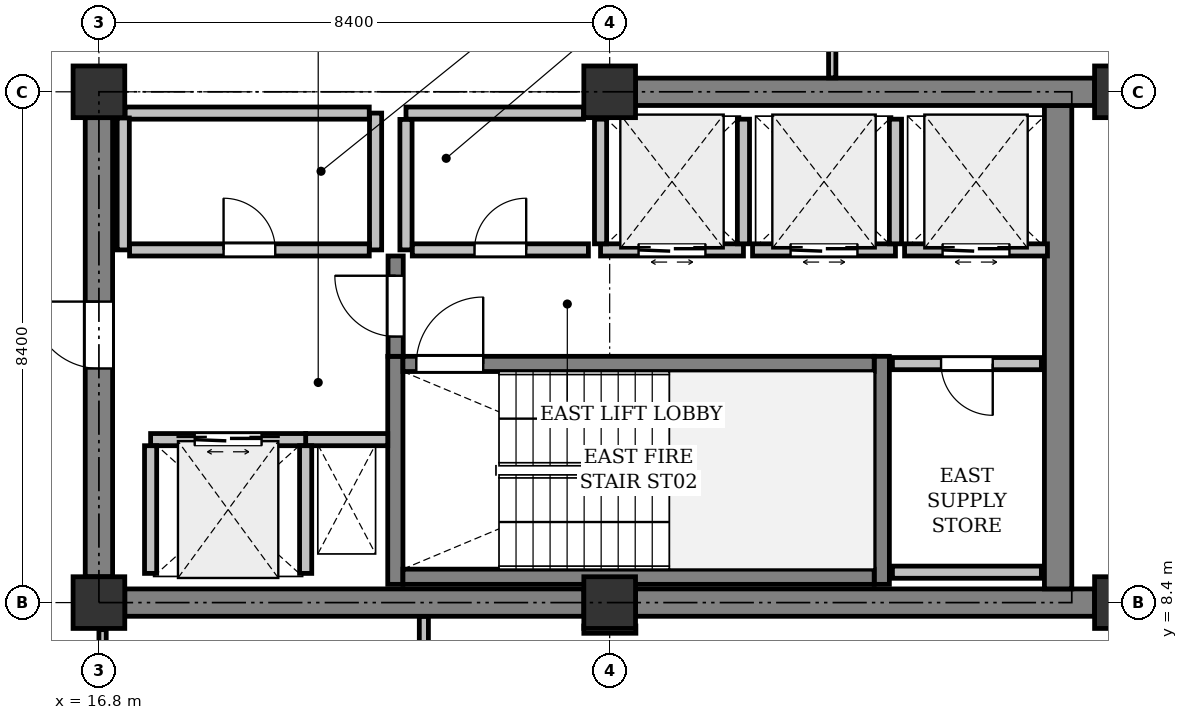
"""IFC4 building model, lengths in metres.
Left out: names, types, materials, properties, quantities, classifications, styles, units other than length and angle.
Written with IfcOpenShell. Run it as: python <this file> out.ifc"""

import sys

from ifc_helpers import new_model, si_unit, direction, frame, frame_2d, origin, origin_2d, place, context, subcontext, project, spatial, rectangle, extrude, element, fill, save


model = new_model("IFC4")
c1 = context("Model", 3, precision=1e-05, world=origin(), true_north=direction((0.0, 1.0)))
c2 = subcontext(c1, "Body", "Model", "MODEL_VIEW")
j1 = project(units=[si_unit("LENGTHUNIT", "METRE"), si_unit("PLANEANGLEUNIT", "RADIAN")], contexts=[c1])
p1 = place(None, origin())
s1 = spatial("IfcSite", under=j1, at=p1, CompositionType="ELEMENT")
p2 = place(p1, origin())
s2 = spatial("IfcBuilding", under=s1, at=p2, CompositionType="ELEMENT")
p3 = place(p2, frame((0.0, 0.0, 290.2)))
s3 = spatial("IfcBuildingStorey", under=s2, at=p3, CompositionType="ELEMENT", Elevation=290.2)
for number, where, z_axis, x_axis in (
    (1, (16.8, 8.4, 0.0), (0.0, 0.0, 1.0), (1.0, 0.0, 0.0)),
    (2, (16.8, 16.8, 0.0), (0.0, 0.0, 1.0), (1.0, 0.0, 0.0)),
    (3, (25.2, 8.4, 0.0), (0.0, 0.0, 1.0), (1.0, 0.0, 0.0)),
    (4, (25.2, 16.8, 0.0), (0.0, 0.0, 1.0), (1.0, 0.0, 0.0)),
    (5, (33.6, 8.4, 0.0), (0.0, 0.0, 1.0), (1.0, 0.0, 0.0)),
    (6, (33.6, 16.8, 0.0), (0.0, 0.0, 1.0), (1.0, 0.0, 0.0)),
):
    element("IfcColumn", number, at=place(p3, frame(where, z_axis=z_axis, x_axis=x_axis)), inside=s3, PredefinedType="COLUMN", context=c2, shape_type="SweptSolid", body=[
        extrude(rectangle(XDim=0.85, YDim=0.85, at=origin_2d()), origin(), (0.0, 0.0, 1.0), 4.0),
    ])
p4 = place(p3, frame((17.225, 8.4, 0.0), z_axis=(0.0, 0.0, 1.0), x_axis=(1.0, 0.0, 0.0)))
e7 = element("IfcWall", 7, at=p4, inside=s3, PredefinedType="SHEAR", context=c2, shape_type="SweptSolid", body=[
    extrude(rectangle(XDim=7.55, YDim=0.45, at=frame_2d((3.775, 0.0))), origin(), (0.0, 0.0, 1.0), 3.725),
])
p5 = place(p3, frame((25.625, 8.4, 0.0), z_axis=(0.0, 0.0, 1.0), x_axis=(1.0, 0.0, 0.0)))
e8 = element("IfcWall", 8, at=p5, inside=s3, PredefinedType="SHEAR", context=c2, shape_type="SweptSolid", body=[
    extrude(rectangle(XDim=7.55, YDim=0.45, at=frame_2d((3.775, 0.0))), origin(), (0.0, 0.0, 1.0), 3.725),
])
p6 = place(p3, frame((32.575, 8.625, 0.0), z_axis=(0.0, 0.0, 1.0), x_axis=(0.0, 1.0, 0.0)))
e9 = element("IfcWall", 9, at=p6, inside=s3, PredefinedType="SHEAR", context=c2, shape_type="SweptSolid", body=[
    extrude(rectangle(XDim=7.95, YDim=0.45, at=frame_2d((3.975, 0.0))), origin(), (0.0, 0.0, 1.0), 3.725),
])
p7 = place(p3, frame((16.8, 8.825, 0.0), z_axis=(0.0, 0.0, 1.0), x_axis=(0.0, 1.0, 0.0)))
e10 = element("IfcWall", 10, at=p7, inside=s3, PredefinedType="SHEAR", context=c2, shape_type="SweptSolid", body=[
    extrude(rectangle(XDim=7.55, YDim=0.45, at=frame_2d((3.775, 0.0))), origin(), (0.0, 0.0, 1.0), 3.725),
])
p8 = place(p7, frame((3.425, 0.0, 0.0)))
e11 = element("IfcOpeningElement", 11, at=p8, cuts=e10, PredefinedType="OPENING", context=c2, shape_type="SweptSolid", body=[
    extrude(rectangle(XDim=1.1, YDim=2.15, at=frame_2d((0.55, 1.075))), frame((0.0, 0.235, 0.0), z_axis=(0.0, -1.0, 0.0), x_axis=(1.0, 0.0, 0.0)), (0.0, 0.0, 1.0), 0.47),
])
p9 = place(p3, frame((25.625, 16.8, 0.0), z_axis=(0.0, 0.0, 1.0), x_axis=(1.0, 0.0, 0.0)))
e12 = element("IfcWall", 12, at=p9, inside=s3, PredefinedType="SHEAR", context=c2, shape_type="SweptSolid", body=[
    extrude(rectangle(XDim=7.55, YDim=0.45, at=frame_2d((3.775, 0.0))), origin(), (0.0, 0.0, 1.0), 3.725),
])
for number, where, z_axis, x_axis in (
    (13, (21.675, 8.7, 0.0), (0.0, 0.0, 1.0), (0.0, 1.0, 0.0)),
    (14, (29.675, 8.7, 0.0), (0.0, 0.0, 1.0), (0.0, 1.0, 0.0)),
):
    element("IfcWall", number, at=place(p3, frame(where, z_axis=z_axis, x_axis=x_axis)), inside=s3, PredefinedType="SHEAR", context=c2, shape_type="SweptSolid", body=[
        extrude(rectangle(XDim=3.75, YDim=0.25, at=frame_2d((1.875, 0.0))), origin(), (0.0, 0.0, 1.0), 3.725),
    ])
p10 = place(p3, frame((21.8, 8.825, 0.0), z_axis=(0.0, 0.0, 1.0), x_axis=(1.0, 0.0, 0.0)))
e15 = element("IfcWall", 15, at=p10, inside=s3, PredefinedType="SHEAR", context=c2, shape_type="SweptSolid", body=[
    extrude(rectangle(XDim=7.75, YDim=0.25, at=frame_2d((3.875, 0.0))), origin(), (0.0, 0.0, 1.0), 3.725),
])
p11 = place(p3, frame((21.8, 12.325, 0.0), z_axis=(0.0, 0.0, 1.0), x_axis=(1.0, 0.0, 0.0)))
e16 = element("IfcWall", 16, at=p11, inside=s3, PredefinedType="SHEAR", context=c2, shape_type="SweptSolid", body=[
    extrude(rectangle(XDim=7.75, YDim=0.25, at=frame_2d((3.875, 0.0))), origin(), (0.0, 0.0, 1.0), 3.725),
])
p12 = place(p11, frame((0.22, 0.0, 0.0)))
e17 = element("IfcOpeningElement", 17, at=p12, cuts=e16, PredefinedType="OPENING", context=c2, shape_type="SweptSolid", body=[
    extrude(rectangle(XDim=1.1, YDim=2.15, at=frame_2d((0.55, 1.075))), frame((0.0, 0.135, 0.0), z_axis=(0.0, -1.0, 0.0), x_axis=(1.0, 0.0, 0.0)), (0.0, 0.0, 1.0), 0.27),
])
p13 = place(p3, frame((20.2, 11.08, 0.0), z_axis=(0.0, 0.0, 1.0), x_axis=(1.0, 0.0, 0.0)))
e18 = element("IfcWall", 18, at=p13, inside=s3, PredefinedType="PARTITIONING", context=c2, shape_type="SweptSolid", body=[
    extrude(rectangle(XDim=1.35, YDim=0.2, at=frame_2d((0.675, 0.0))), origin(), (0.0, 0.0, 1.0), 3.725),
])
p14 = place(p3, frame((21.68, 12.45, 0.0), z_axis=(0.0, 0.0, 1.0), x_axis=(0.0, 1.0, 0.0)))
e19 = element("IfcWall", 19, at=p14, inside=s3, PredefinedType="SHEAR", context=c2, shape_type="SweptSolid", body=[
    extrude(rectangle(XDim=1.65, YDim=0.25, at=frame_2d((0.825, 0.0))), origin(), (0.0, 0.0, 1.0), 3.725),
])
p15 = place(p14, frame((0.325, 0.0, 0.0)))
e20 = element("IfcOpeningElement", 20, at=p15, cuts=e19, PredefinedType="OPENING", context=c2, shape_type="SweptSolid", body=[
    extrude(rectangle(XDim=1.0, YDim=2.15, at=frame_2d((0.5, 1.075))), frame((0.0, 0.135, 0.0), z_axis=(0.0, -1.0, 0.0), x_axis=(1.0, 0.0, 0.0)), (0.0, 0.0, 1.0), 0.27),
])
p16 = place(p3, frame((17.65, 11.08, 0.0), z_axis=(0.0, 0.0, 1.0), x_axis=(1.0, 0.0, 0.0)))
e21 = element("IfcWall", 21, at=p16, inside=s3, PredefinedType="PARTITIONING", context=c2, shape_type="SweptSolid", body=[
    extrude(rectangle(XDim=2.55, YDim=0.2, at=frame_2d((1.275, 0.0))), origin(), (0.0, 0.0, 1.0), 3.725),
])
p17 = place(p16, frame((0.725, 0.0, 0.0)))
e22 = element("IfcOpeningElement", 22, at=p17, cuts=e21, PredefinedType="OPENING", context=c2, shape_type="SweptSolid", body=[
    extrude(rectangle(XDim=1.1, YDim=2.2, at=frame_2d((0.55, 1.1))), frame((0.0, 0.11, 0.0), z_axis=(0.0, -1.0, 0.0), x_axis=(1.0, 0.0, 0.0)), (0.0, 0.0, 1.0), 0.22),
])
for number, where, z_axis, x_axis in (
    (23, (20.2, 8.88, 0.0), (0.0, 0.0, 1.0), (0.0, 1.0, 0.0)),
    (24, (17.65, 8.88, 0.0), (0.0, 0.0, 1.0), (0.0, 1.0, 0.0)),
):
    element("IfcWall", number, at=place(p3, frame(where, z_axis=z_axis, x_axis=x_axis)), inside=s3, PredefinedType="PARTITIONING", context=c2, shape_type="SweptSolid", body=[
        extrude(rectangle(XDim=2.1, YDim=0.2, at=frame_2d((1.05, 0.0))), origin(), (0.0, 0.0, 1.0), 3.725),
    ])
p18 = place(p3, frame((25.05, 14.2, 0.0), z_axis=(0.0, 0.0, 1.0), x_axis=(1.0, 0.0, 0.0)))
e25 = element("IfcWall", 25, at=p18, inside=s3, PredefinedType="PARTITIONING", context=c2, shape_type="SweptSolid", body=[
    extrude(rectangle(XDim=2.35, YDim=0.2, at=frame_2d((1.175, 0.0))), origin(), (0.0, 0.0, 1.0), 3.725),
])
p19 = place(p18, frame((0.625, 0.0, 0.0)))
e26 = element("IfcOpeningElement", 26, at=p19, cuts=e25, PredefinedType="OPENING", context=c2, shape_type="SweptSolid", body=[
    extrude(rectangle(XDim=1.1, YDim=2.2, at=frame_2d((0.55, 1.1))), frame((0.0, 0.11, 0.0), z_axis=(0.0, -1.0, 0.0), x_axis=(1.0, 0.0, 0.0)), (0.0, 0.0, 1.0), 0.22),
])
for number, where, z_axis, x_axis in (
    (27, (27.4, 14.3, 0.0), (0.0, 0.0, 1.0), (0.0, 1.0, 0.0)),
    (28, (25.05, 14.3, 0.0), (0.0, 0.0, 1.0), (0.0, 1.0, 0.0)),
):
    element("IfcWall", number, at=place(p3, frame(where, z_axis=z_axis, x_axis=x_axis)), inside=s3, PredefinedType="PARTITIONING", context=c2, shape_type="SweptSolid", body=[
        extrude(rectangle(XDim=2.05, YDim=0.2, at=frame_2d((1.025, 0.0))), origin(), (0.0, 0.0, 1.0), 3.725),
    ])
p20 = place(p3, frame((27.55, 14.2, 0.0), z_axis=(0.0, 0.0, 1.0), x_axis=(1.0, 0.0, 0.0)))
e29 = element("IfcWall", 29, at=p20, inside=s3, PredefinedType="PARTITIONING", context=c2, shape_type="SweptSolid", body=[
    extrude(rectangle(XDim=2.35, YDim=0.2, at=frame_2d((1.175, 0.0))), origin(), (0.0, 0.0, 1.0), 3.725),
])
p21 = place(p20, frame((0.625, 0.0, 0.0)))
e30 = element("IfcOpeningElement", 30, at=p21, cuts=e29, PredefinedType="OPENING", context=c2, shape_type="SweptSolid", body=[
    extrude(rectangle(XDim=1.1, YDim=2.2, at=frame_2d((0.55, 1.1))), frame((0.0, 0.11, 0.0), z_axis=(0.0, -1.0, 0.0), x_axis=(1.0, 0.0, 0.0)), (0.0, 0.0, 1.0), 0.22),
])
p22 = place(p3, frame((29.9, 14.3, 0.0), z_axis=(0.0, 0.0, 1.0), x_axis=(0.0, 1.0, 0.0)))
e31 = element("IfcWall", 31, at=p22, inside=s3, PredefinedType="PARTITIONING", context=c2, shape_type="SweptSolid", body=[
    extrude(rectangle(XDim=2.05, YDim=0.2, at=frame_2d((1.025, 0.0))), origin(), (0.0, 0.0, 1.0), 3.725),
])
p23 = place(p3, frame((30.05, 14.2, 0.0), z_axis=(0.0, 0.0, 1.0), x_axis=(1.0, 0.0, 0.0)))
e32 = element("IfcWall", 32, at=p23, inside=s3, PredefinedType="PARTITIONING", context=c2, shape_type="SweptSolid", body=[
    extrude(rectangle(XDim=2.35, YDim=0.2, at=frame_2d((1.175, 0.0))), origin(), (0.0, 0.0, 1.0), 3.725),
])
p24 = place(p23, frame((0.625, 0.0, 0.0)))
e33 = element("IfcOpeningElement", 33, at=p24, cuts=e32, PredefinedType="OPENING", context=c2, shape_type="SweptSolid", body=[
    extrude(rectangle(XDim=1.1, YDim=2.2, at=frame_2d((0.55, 1.1))), frame((0.0, 0.11, 0.0), z_axis=(0.0, -1.0, 0.0), x_axis=(1.0, 0.0, 0.0)), (0.0, 0.0, 1.0), 0.22),
])
p25 = place(p3, frame((21.35, 14.2, 0.0), z_axis=(0.0, 0.0, 1.0), x_axis=(0.0, 1.0, 0.0)))
e34 = element("IfcWall", 34, at=p25, inside=s3, PredefinedType="PARTITIONING", context=c2, shape_type="SweptSolid", body=[
    extrude(rectangle(XDim=2.25, YDim=0.2, at=frame_2d((1.125, 0.0))), origin(), (0.0, 0.0, 1.0), 3.725),
])
p26 = place(p3, frame((21.246, 16.45, 0.0), z_axis=(0.0, 0.0, 1.0), x_axis=(-1.0, 0.0, 0.0)))
e35 = element("IfcWall", 35, at=p26, inside=s3, PredefinedType="PARTITIONING", context=c2, shape_type="SweptSolid", body=[
    extrude(rectangle(XDim=4.016, YDim=0.2, at=frame_2d((2.008, 0.0))), origin(), (0.0, 0.0, 1.0), 3.725),
])
p27 = place(p3, frame((17.2, 16.37, 0.0), z_axis=(0.0, 0.0, 1.0), x_axis=(0.0, -1.0, 0.0)))
e36 = element("IfcWall", 36, at=p27, inside=s3, PredefinedType="PARTITIONING", context=c2, shape_type="SweptSolid", body=[
    extrude(rectangle(XDim=2.17, YDim=0.2, at=frame_2d((1.085, 0.0))), origin(), (0.0, 0.0, 1.0), 3.725),
])
p28 = place(p3, frame((17.304, 14.2, 0.0), z_axis=(0.0, 0.0, 1.0), x_axis=(1.0, 0.0, 0.0)))
e37 = element("IfcWall", 37, at=p28, inside=s3, PredefinedType="PARTITIONING", context=c2, shape_type="SweptSolid", body=[
    extrude(rectangle(XDim=3.942, YDim=0.2, at=frame_2d((1.971, 0.0))), origin(), (0.0, 0.0, 1.0), 3.725),
])
p29 = place(p28, frame((1.546, 0.0, 0.0)))
e38 = element("IfcOpeningElement", 38, at=p29, cuts=e37, PredefinedType="OPENING", context=c2, shape_type="SweptSolid", body=[
    extrude(rectangle(XDim=0.85, YDim=2.15, at=frame_2d((0.425, 1.075))), frame((0.0, 0.11, 0.0), z_axis=(0.0, -1.0, 0.0), x_axis=(1.0, 0.0, 0.0)), (0.0, 0.0, 1.0), 0.22),
])
p30 = place(p3, frame((24.77, 16.45, 0.0), z_axis=(0.0, 0.0, 1.0), x_axis=(-1.0, 0.0, 0.0)))
e39 = element("IfcWall", 39, at=p30, inside=s3, PredefinedType="PARTITIONING", context=c2, shape_type="SweptSolid", body=[
    extrude(rectangle(XDim=2.92, YDim=0.2, at=frame_2d((1.46, 0.0))), origin(), (0.0, 0.0, 1.0), 3.725),
])
p31 = place(p3, frame((21.85, 16.346, 0.0), z_axis=(0.0, 0.0, 1.0), x_axis=(0.0, -1.0, 0.0)))
e40 = element("IfcWall", 40, at=p31, inside=s3, PredefinedType="PARTITIONING", context=c2, shape_type="SweptSolid", body=[
    extrude(rectangle(XDim=2.146, YDim=0.2, at=frame_2d((1.073, 0.0))), origin(), (0.0, 0.0, 1.0), 3.725),
])
p32 = place(p3, frame((21.954, 14.2, 0.0), z_axis=(0.0, 0.0, 1.0), x_axis=(1.0, 0.0, 0.0)))
e41 = element("IfcWall", 41, at=p32, inside=s3, PredefinedType="PARTITIONING", context=c2, shape_type="SweptSolid", body=[
    extrude(rectangle(XDim=2.896, YDim=0.2, at=frame_2d((1.448, 0.0))), origin(), (0.0, 0.0, 1.0), 3.725),
])
p33 = place(p32, frame((1.023, 0.0, 0.0)))
e42 = element("IfcOpeningElement", 42, at=p33, cuts=e41, PredefinedType="OPENING", context=c2, shape_type="SweptSolid", body=[
    extrude(rectangle(XDim=0.85, YDim=2.15, at=frame_2d((0.425, 1.075))), frame((0.0, 0.11, 0.0), z_axis=(0.0, -1.0, 0.0), x_axis=(1.0, 0.0, 0.0)), (0.0, 0.0, 1.0), 0.22),
])
p34 = place(p3, frame((32.3, 12.33, 0.0), z_axis=(0.0, 0.0, 1.0), x_axis=(-1.0, 0.0, 0.0)))
e43 = element("IfcWall", 43, at=p34, inside=s3, PredefinedType="PARTITIONING", context=c2, shape_type="SweptSolid", body=[
    extrude(rectangle(XDim=2.45, YDim=0.2, at=frame_2d((1.225, 0.0))), origin(), (0.0, 0.0, 1.0), 3.725),
])
p35 = place(p34, frame((0.8, 0.0, 0.0)))
e44 = element("IfcOpeningElement", 44, at=p35, cuts=e43, PredefinedType="OPENING", context=c2, shape_type="SweptSolid", body=[
    extrude(rectangle(XDim=0.85, YDim=2.15, at=frame_2d((0.425, 1.075))), frame((0.0, 0.11, 0.0), z_axis=(0.0, -1.0, 0.0), x_axis=(1.0, 0.0, 0.0)), (0.0, 0.0, 1.0), 0.22),
])
p36 = place(p3, frame((29.85, 8.9, 0.0), z_axis=(0.0, 0.0, 1.0), x_axis=(1.0, 0.0, 0.0)))
e45 = element("IfcWall", 45, at=p36, inside=s3, PredefinedType="PARTITIONING", context=c2, shape_type="SweptSolid", body=[
    extrude(rectangle(XDim=2.45, YDim=0.2, at=frame_2d((1.225, 0.0))), origin(), (0.0, 0.0, 1.0), 3.725),
])
p37 = place(p3, frame((22.144, 0.124, 0.0), z_axis=(0.0, 0.0, 1.0), x_axis=(0.0, 1.0, 0.0)))
e46 = element("IfcWall", 46, at=p37, inside=s3, PredefinedType="PARTITIONING", context=c2, shape_type="SweptSolid", body=[
    extrude(rectangle(XDim=8.047, YDim=0.15, at=frame_2d((4.023, 0.0))), origin(), (0.0, 0.0, 1.0), 3.725),
])
p38 = place(p3, frame((16.86, 7.955, 0.0), z_axis=(0.0, 0.0, 1.0), x_axis=(0.0, -1.0, 0.0)))
e47 = element("IfcWall", 47, at=p38, inside=s3, PredefinedType="PARTITIONING", context=c2, shape_type="SweptSolid", body=[
    extrude(rectangle(XDim=2.555, YDim=0.12, at=frame_2d((1.278, 0.0))), origin(), (0.0, 0.0, 1.0), 3.319),
])
p39 = place(p38, frame((0.802, 0.0, 0.0)))
e48 = element("IfcOpeningElement", 48, at=p39, cuts=e47, PredefinedType="OPENING", context=c2, shape_type="SweptSolid", body=[
    extrude(rectangle(XDim=0.95, YDim=2.15, at=frame_2d((0.475, 1.075))), frame((0.0, 0.07, 0.0), z_axis=(0.0, -1.0, 0.0), x_axis=(1.0, 0.0, 0.0)), (0.0, 0.0, 1.0), 0.14),
])
p40 = place(p3, frame((28.86, 19.05, 0.0), z_axis=(0.0, 0.0, 1.0), x_axis=(0.0, -1.0, 0.0)))
e49 = element("IfcWall", 49, at=p40, inside=s3, PredefinedType="PARTITIONING", context=c2, shape_type="SweptSolid", body=[
    extrude(rectangle(XDim=2.021, YDim=0.12, at=frame_2d((1.01, 0.0))), origin(), (0.0, 0.0, 1.0), 3.725),
])
p41 = place(p3, frame((25.631, 7.956, 0.0), z_axis=(0.0, 0.0, 1.0), x_axis=(-0.99999963391, -0.000855675671, 0.0)))
e50 = element("IfcWall", 50, at=p41, inside=s3, PredefinedType="PARTITIONING", context=c2, shape_type="SweptSolid", body=[
    extrude(rectangle(XDim=0.856, YDim=0.12, at=frame_2d((0.428, 0.0))), origin(), (0.0, 0.0, 1.0), 3.319),
])
p42 = place(p8, origin())
e51 = element("IfcDoor", 51, at=p42, inside=s3, OperationType="SINGLE_SWING_RIGHT", PredefinedType="DOOR", context=c2, shape_type="SweptSolid", body=[
    extrude(rectangle(XDim=1.1, YDim=2.15, at=frame_2d((0.55, 1.075))), frame((0.0, 0.025, 0.0), z_axis=(0.0, -1.0, 0.0), x_axis=(1.0, 0.0, 0.0)), (0.0, 0.0, 1.0), 0.05),
])
fill(e11, e51)
p43 = place(p12, origin())
e52 = element("IfcDoor", 52, at=p43, inside=s3, OperationType="SINGLE_SWING_RIGHT", PredefinedType="DOOR", context=c2, shape_type="SweptSolid", body=[
    extrude(rectangle(XDim=1.1, YDim=2.15, at=frame_2d((0.55, 1.075))), frame((0.0, 0.025, 0.0), z_axis=(0.0, -1.0, 0.0), x_axis=(1.0, 0.0, 0.0)), (0.0, 0.0, 1.0), 0.05),
])
fill(e17, e52)
p44 = place(p15, origin())
e53 = element("IfcDoor", 53, at=p44, inside=s3, OperationType="SINGLE_SWING_RIGHT", PredefinedType="DOOR", context=c2, shape_type="SweptSolid", body=[
    extrude(rectangle(XDim=1.0, YDim=2.15, at=frame_2d((0.5, 1.075))), frame((0.0, 0.025, 0.0), z_axis=(0.0, -1.0, 0.0), x_axis=(1.0, 0.0, 0.0)), (0.0, 0.0, 1.0), 0.05),
])
fill(e20, e53)
p45 = place(p17, origin())
e54 = element("IfcDoor", 54, at=p45, inside=s3, OperationType="DOUBLE_DOOR_SLIDING", PredefinedType="DOOR", context=c2, shape_type="SweptSolid", body=[
    extrude(rectangle(XDim=1.1, YDim=2.2, at=frame_2d((0.55, 1.1))), frame((0.0, 0.025, 0.0), z_axis=(0.0, -1.0, 0.0), x_axis=(1.0, 0.0, 0.0)), (0.0, 0.0, 1.0), 0.05),
])
fill(e22, e54)
p46 = place(p19, origin())
e55 = element("IfcDoor", 55, at=p46, inside=s3, OperationType="DOUBLE_DOOR_SLIDING", PredefinedType="DOOR", context=c2, shape_type="SweptSolid", body=[
    extrude(rectangle(XDim=1.1, YDim=2.2, at=frame_2d((0.55, 1.1))), frame((0.0, 0.025, 0.0), z_axis=(0.0, -1.0, 0.0), x_axis=(1.0, 0.0, 0.0)), (0.0, 0.0, 1.0), 0.05),
])
fill(e26, e55)
p47 = place(p21, origin())
e56 = element("IfcDoor", 56, at=p47, inside=s3, OperationType="DOUBLE_DOOR_SLIDING", PredefinedType="DOOR", context=c2, shape_type="SweptSolid", body=[
    extrude(rectangle(XDim=1.1, YDim=2.2, at=frame_2d((0.55, 1.1))), frame((0.0, 0.025, 0.0), z_axis=(0.0, -1.0, 0.0), x_axis=(1.0, 0.0, 0.0)), (0.0, 0.0, 1.0), 0.05),
])
fill(e30, e56)
p48 = place(p24, origin())
e57 = element("IfcDoor", 57, at=p48, inside=s3, OperationType="DOUBLE_DOOR_SLIDING", PredefinedType="DOOR", context=c2, shape_type="SweptSolid", body=[
    extrude(rectangle(XDim=1.1, YDim=2.2, at=frame_2d((0.55, 1.1))), frame((0.0, 0.025, 0.0), z_axis=(0.0, -1.0, 0.0), x_axis=(1.0, 0.0, 0.0)), (0.0, 0.0, 1.0), 0.05),
])
fill(e33, e57)
p49 = place(p29, origin())
e58 = element("IfcDoor", 58, at=p49, inside=s3, OperationType="SINGLE_SWING_LEFT", PredefinedType="DOOR", context=c2, shape_type="SweptSolid", body=[
    extrude(rectangle(XDim=0.85, YDim=2.15, at=frame_2d((0.425, 1.075))), frame((0.0, 0.025, 0.0), z_axis=(0.0, -1.0, 0.0), x_axis=(1.0, 0.0, 0.0)), (0.0, 0.0, 1.0), 0.05),
])
fill(e38, e58)
p50 = place(p33, origin())
e59 = element("IfcDoor", 59, at=p50, inside=s3, OperationType="SINGLE_SWING_RIGHT", PredefinedType="DOOR", context=c2, shape_type="SweptSolid", body=[
    extrude(rectangle(XDim=0.85, YDim=2.15, at=frame_2d((0.425, 1.075))), frame((0.0, 0.025, 0.0), z_axis=(0.0, -1.0, 0.0), x_axis=(1.0, 0.0, 0.0)), (0.0, 0.0, 1.0), 0.05),
])
fill(e42, e59)
p51 = place(p35, origin())
e60 = element("IfcDoor", 60, at=p51, inside=s3, OperationType="SINGLE_SWING_LEFT", PredefinedType="DOOR", context=c2, shape_type="SweptSolid", body=[
    extrude(rectangle(XDim=0.85, YDim=2.15, at=frame_2d((0.425, 1.075))), frame((0.0, 0.025, 0.0), z_axis=(0.0, -1.0, 0.0), x_axis=(1.0, 0.0, 0.0)), (0.0, 0.0, 1.0), 0.05),
])
fill(e44, e60)
save(model, sys.argv[1])
